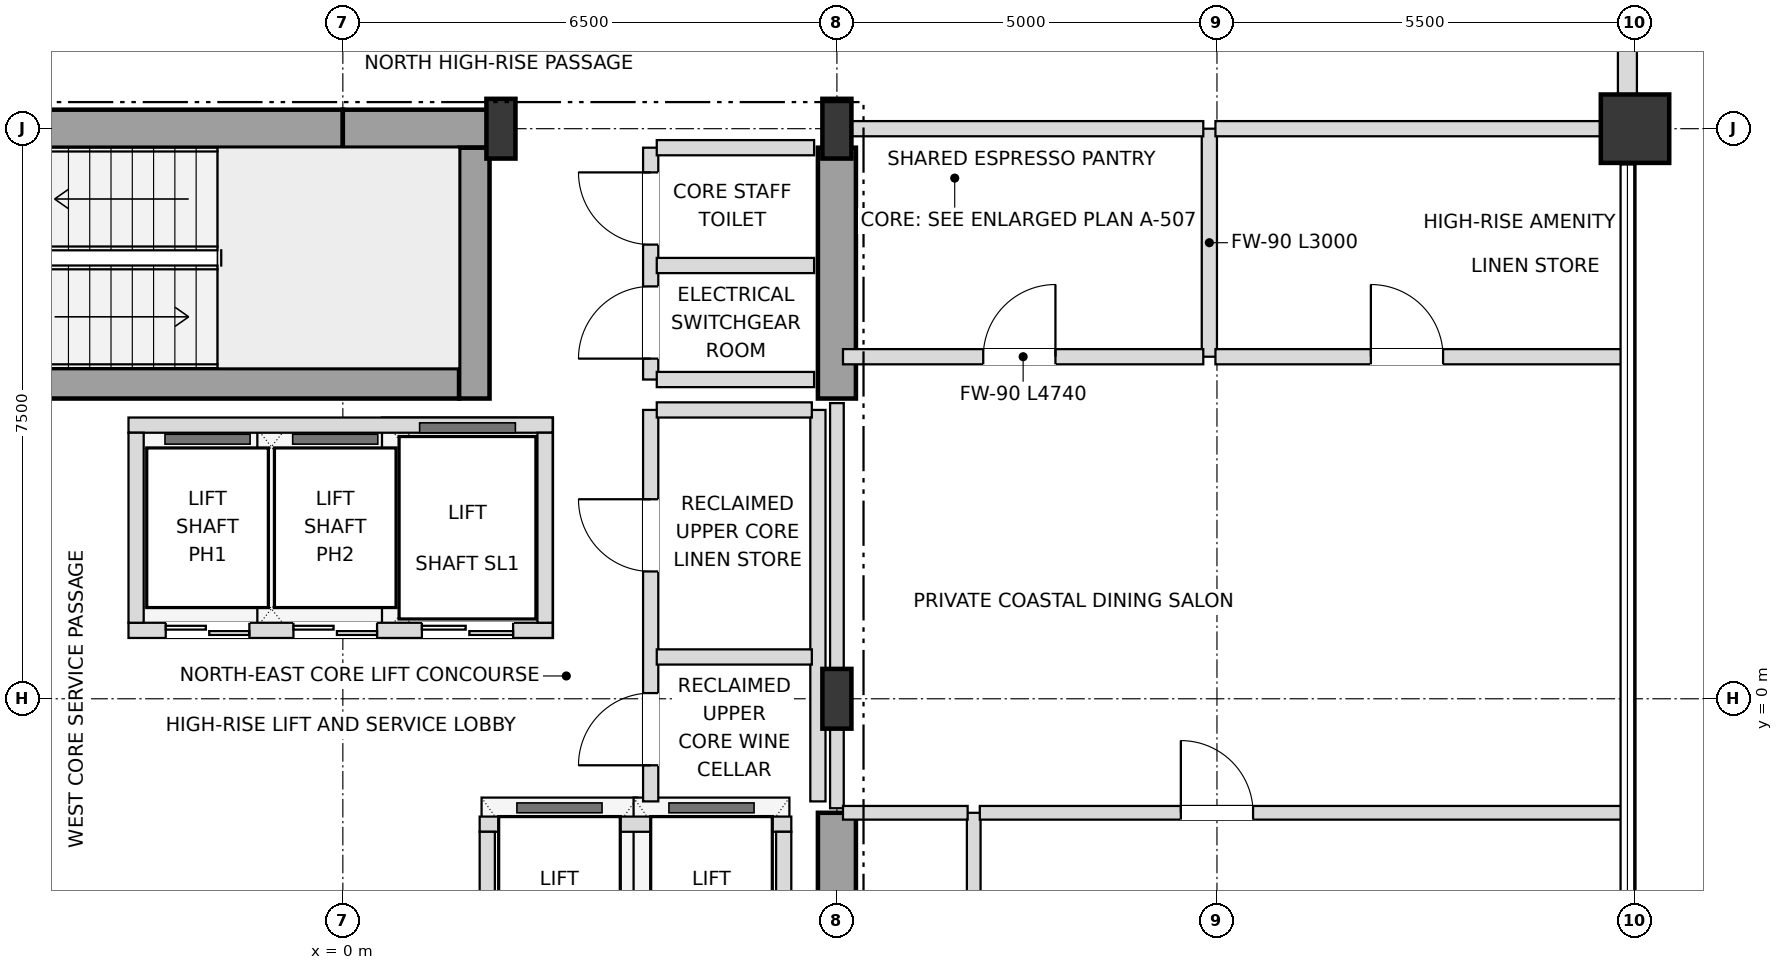
"""IFC4 building model, lengths in metres.
Left out: names, types, materials, properties, quantities, classifications, styles, units other than length and angle.
Written with IfcOpenShell. Run it as: python <this file> out.ifc"""

import sys

from ifc_helpers import new_model, si_unit, direction, frame, frame_2d, origin, origin_2d, place, context, subcontext, project, spatial, rectangle, i_section, extrude, element, fill, save


model = new_model("IFC4")
c1 = context("Model", 3, precision=1e-05, world=origin(), true_north=direction((0.0, 1.0)))
c2 = subcontext(c1, "Body", "Model", "MODEL_VIEW")
j1 = project(units=[si_unit("LENGTHUNIT", "METRE"), si_unit("PLANEANGLEUNIT", "RADIAN")], contexts=[c1])
p1 = place(None, origin())
s1 = spatial("IfcSite", under=j1, at=p1, CompositionType="ELEMENT")
p2 = place(p1, origin())
s2 = spatial("IfcBuilding", under=s1, at=p2, CompositionType="ELEMENT")
p3 = place(p2, frame((0.0, 0.0, 297.9)))
s3 = spatial("IfcBuildingStorey", under=s2, at=p3, CompositionType="ELEMENT", Elevation=297.9)
for number, where, z_axis, x_axis in (
    (1, (6.5, 0.0, 0.0), (0.0, 0.0, 1.0), (1.0, 0.0, 0.0)),
    (2, (2.08, 7.5, 0.0), (0.0, 0.0, 1.0), (1.0, 0.0, 0.0)),
    (3, (6.5, 7.5, 0.0), (0.0, 0.0, 1.0), (1.0, 0.0, 0.0)),
):
    element("IfcColumn", number, at=place(p3, frame(where, z_axis=z_axis, x_axis=x_axis)), inside=s3, PredefinedType="COLUMN", context=c2, shape_type="SweptSolid", body=[
        extrude(i_section(OverallWidth=0.382, OverallDepth=0.786, WebThickness=0.02, FlangeThickness=0.033, at=origin_2d()), origin(), (0.0, 0.0, 1.0), 3.6),
    ])
p4 = place(p3, frame((17.0, 7.5, 0.0), z_axis=(0.0, 0.0, 1.0), x_axis=(1.0, 0.0, 0.0)))
e4 = element("IfcColumn", 4, at=p4, inside=s3, PredefinedType="USERDEFINED", context=c2, shape_type="SweptSolid", body=[
    extrude(rectangle(XDim=0.9, YDim=0.9, at=origin_2d()), origin(), (0.0, 0.0, 1.0), 3.6),
])
p5 = place(p3, frame((16.9, 7.945, 0.0), z_axis=(0.0, 0.0, 1.0), x_axis=(0.0, 1.0, 0.0)))
e5 = element("IfcWall", 5, at=p5, inside=s3, PredefinedType="SOLIDWALL", context=c2, shape_type="SweptSolid", body=[
    extrude(rectangle(XDim=4.61, YDim=0.25, at=frame_2d((2.305, 0.0))), origin(), (0.0, 0.0, 1.0), 2.748),
])
p6 = place(p5, frame((1.405, 0.0, 0.72)))
e6 = element("IfcOpeningElement", 6, at=p6, cuts=e5, PredefinedType="OPENING", context=c2, shape_type="SweptSolid", body=[
    extrude(rectangle(XDim=1.8, YDim=1.68, at=frame_2d((0.9, 0.84))), frame((0.0, 0.135, 0.0), z_axis=(0.0, -1.0, 0.0), x_axis=(1.0, 0.0, 0.0)), (0.0, 0.0, 1.0), 0.27),
])
p7 = place(p3, frame((-6.75, 7.5, 0.0), z_axis=(0.0, 0.0, 1.0), x_axis=(1.0, 0.0, 0.0)))
e7 = element("IfcWall", 7, at=p7, inside=s3, PredefinedType="SHEAR", context=c2, shape_type="SweptSolid", body=[
    extrude(rectangle(XDim=6.75, YDim=0.5, at=frame_2d((3.375, 0.0))), origin(), (0.0, 0.0, 1.0), 3.38),
])
p8 = place(p7, frame((1.65, 0.0, 0.0)))
e8 = element("IfcOpeningElement", 8, at=p8, cuts=e7, PredefinedType="OPENING", context=c2, shape_type="SweptSolid", body=[
    extrude(rectangle(XDim=1.05, YDim=2.15, at=frame_2d((0.525, 1.075))), frame((0.0, 0.26, 0.0), z_axis=(0.0, -1.0, 0.0), x_axis=(1.0, 0.0, 0.0)), (0.0, 0.0, 1.0), 0.52),
])
p9 = place(p3, frame((0.0, 7.5, 0.0), z_axis=(0.0, 0.0, 1.0), x_axis=(1.0, 0.0, 0.0)))
e9 = element("IfcWall", 9, at=p9, inside=s3, PredefinedType="SHEAR", context=c2, shape_type="SweptSolid", body=[
    extrude(rectangle(XDim=2.08, YDim=0.5, at=frame_2d((1.04, 0.0))), origin(), (0.0, 0.0, 1.0), 3.38),
])
p10 = place(p3, frame((6.5, -7.25, 0.0), z_axis=(0.0, 0.0, 1.0), x_axis=(0.0, 1.0, 0.0)))
e10 = element("IfcWall", 10, at=p10, inside=s3, PredefinedType="SHEAR", context=c2, shape_type="SweptSolid", body=[
    extrude(rectangle(XDim=5.75, YDim=0.5, at=frame_2d((2.875, 0.0))), origin(), (0.0, 0.0, 1.0), 3.38),
])
p11 = place(p10, frame((0.85, 0.0, 0.0)))
e11 = element("IfcOpeningElement", 11, at=p11, cuts=e10, PredefinedType="OPENING", context=c2, shape_type="SweptSolid", body=[
    extrude(rectangle(XDim=1.05, YDim=2.15, at=frame_2d((0.525, 1.075))), frame((0.0, 0.26, 0.0), z_axis=(0.0, -1.0, 0.0), x_axis=(1.0, 0.0, 0.0)), (0.0, 0.0, 1.0), 0.52),
])
p12 = place(p3, frame((6.5, 3.95, 0.0), z_axis=(0.0, 0.0, 1.0), x_axis=(0.0, 1.0, 0.0)))
e12 = element("IfcWall", 12, at=p12, inside=s3, PredefinedType="SHEAR", context=c2, shape_type="SweptSolid", body=[
    extrude(rectangle(XDim=3.3, YDim=0.5, at=frame_2d((1.65, 0.0))), origin(), (0.0, 0.0, 1.0), 3.38),
])
p13 = place(p3, frame((-5.55, 4.15, 0.0), z_axis=(0.0, 0.0, 1.0), x_axis=(1.0, 0.0, 0.0)))
e13 = element("IfcWall", 13, at=p13, inside=s3, PredefinedType="SHEAR", context=c2, shape_type="SweptSolid", body=[
    extrude(rectangle(XDim=7.08, YDim=0.4, at=frame_2d((3.54, 0.0))), origin(), (0.0, 0.0, 1.0), 3.38),
])
p14 = place(p3, frame((1.73, 3.95, 0.0), z_axis=(0.0, 0.0, 1.0), x_axis=(0.0, 1.0, 0.0)))
e14 = element("IfcWall", 14, at=p14, inside=s3, PredefinedType="SHEAR", context=c2, shape_type="SweptSolid", body=[
    extrude(rectangle(XDim=3.3, YDim=0.4, at=frame_2d((1.65, 0.0))), origin(), (0.0, 0.0, 1.0), 3.38),
])
p15 = place(p3, frame((-2.82, 0.9, 0.0), z_axis=(0.0, 0.0, 1.0), x_axis=(1.0, 0.0, 0.0)))
e15 = element("IfcWall", 15, at=p15, inside=s3, PredefinedType="SOLIDWALL", context=c2, shape_type="SweptSolid", body=[
    extrude(rectangle(XDim=5.58, YDim=0.2, at=frame_2d((2.79, 0.0))), origin(), (0.0, 0.0, 1.0), 3.38),
])
p16 = place(p15, frame((0.49, 0.0, 0.0)))
e16 = element("IfcOpeningElement", 16, at=p16, cuts=e15, PredefinedType="OPENING", context=c2, shape_type="SweptSolid", body=[
    extrude(rectangle(XDim=1.1, YDim=2.15, at=frame_2d((0.55, 1.075))), frame((0.0, 0.11, 0.0), z_axis=(0.0, -1.0, 0.0), x_axis=(1.0, 0.0, 0.0)), (0.0, 0.0, 1.0), 0.22),
])
p17 = place(p15, frame((2.17, 0.0, 0.0)))
e17 = element("IfcOpeningElement", 17, at=p17, cuts=e15, PredefinedType="OPENING", context=c2, shape_type="SweptSolid", body=[
    extrude(rectangle(XDim=1.1, YDim=2.15, at=frame_2d((0.55, 1.075))), frame((0.0, 0.11, 0.0), z_axis=(0.0, -1.0, 0.0), x_axis=(1.0, 0.0, 0.0)), (0.0, 0.0, 1.0), 0.22),
])
p18 = place(p15, frame((3.86, 0.0, 0.0)))
e18 = element("IfcOpeningElement", 18, at=p18, cuts=e15, PredefinedType="OPENING", context=c2, shape_type="SweptSolid", body=[
    extrude(rectangle(XDim=1.2, YDim=2.2, at=frame_2d((0.6, 1.1))), frame((0.0, 0.11, 0.0), z_axis=(0.0, -1.0, 0.0), x_axis=(1.0, 0.0, 0.0)), (0.0, 0.0, 1.0), 0.22),
])
p19 = place(p3, frame((-2.82, 3.6, 0.0), z_axis=(0.0, 0.0, 1.0), x_axis=(1.0, 0.0, 0.0)))
e19 = element("IfcWall", 19, at=p19, inside=s3, PredefinedType="SOLIDWALL", context=c2, shape_type="SweptSolid", body=[
    extrude(rectangle(XDim=5.58, YDim=0.2, at=frame_2d((2.79, 0.0))), origin(), (0.0, 0.0, 1.0), 3.38),
])
for number, where, z_axis, x_axis in (
    (20, (-2.72, 1.0, 0.0), (0.0, 0.0, 1.0), (0.0, 1.0, 0.0)),
    (21, (2.66, 1.0, 0.0), (0.0, 0.0, 1.0), (0.0, 1.0, 0.0)),
):
    element("IfcWall", number, at=place(p3, frame(where, z_axis=z_axis, x_axis=x_axis)), inside=s3, PredefinedType="SOLIDWALL", context=c2, shape_type="SweptSolid", body=[
        extrude(rectangle(XDim=2.5, YDim=0.2, at=frame_2d((1.25, 0.0))), origin(), (0.0, 0.0, 1.0), 3.38),
    ])
p20 = place(p3, frame((1.8, -1.65, 0.0), z_axis=(0.0, 0.0, 1.0), x_axis=(1.0, 0.0, 0.0)))
e22 = element("IfcWall", 22, at=p20, inside=s3, PredefinedType="SOLIDWALL", context=c2, shape_type="SweptSolid", body=[
    extrude(rectangle(XDim=4.1, YDim=0.2, at=frame_2d((2.05, 0.0))), origin(), (0.0, 0.0, 1.0), 3.38),
])
for number, where, z_axis, x_axis in (
    (23, (1.9, -3.75, 0.0), (0.0, 0.0, 1.0), (0.0, 1.0, 0.0)),
    (24, (5.8, -3.75, 0.0), (0.0, 0.0, 1.0), (0.0, 1.0, 0.0)),
):
    element("IfcWall", number, at=place(p3, frame(where, z_axis=z_axis, x_axis=x_axis)), inside=s3, PredefinedType="SOLIDWALL", context=c2, shape_type="SweptSolid", body=[
        extrude(rectangle(XDim=2.0, YDim=0.2, at=frame_2d((1.0, 0.0))), origin(), (0.0, 0.0, 1.0), 3.38),
    ])
p21 = place(p3, frame((4.05, -1.35, 0.0), z_axis=(0.0, 0.0, 1.0), x_axis=(0.0, 1.0, 0.0)))
e25 = element("IfcWall", 25, at=p21, inside=s3, PredefinedType="SOLIDWALL", context=c2, shape_type="SweptSolid", body=[
    extrude(rectangle(XDim=5.15, YDim=0.2, at=frame_2d((2.575, 0.0))), origin(), (0.0, 0.0, 1.0), 3.38),
])
p22 = place(p21, frame((0.475, 0.0, 0.0)))
e26 = element("IfcOpeningElement", 26, at=p22, cuts=e25, PredefinedType="OPENING", context=c2, shape_type="SweptSolid", body=[
    extrude(rectangle(XDim=0.95, YDim=2.15, at=frame_2d((0.475, 1.075))), frame((0.0, 0.11, 0.0), z_axis=(0.0, -1.0, 0.0), x_axis=(1.0, 0.0, 0.0)), (0.0, 0.0, 1.0), 0.22),
])
p23 = place(p21, frame((3.025, 0.0, 0.0)))
e27 = element("IfcOpeningElement", 27, at=p23, cuts=e25, PredefinedType="OPENING", context=c2, shape_type="SweptSolid", body=[
    extrude(rectangle(XDim=0.95, YDim=2.15, at=frame_2d((0.475, 1.075))), frame((0.0, 0.11, 0.0), z_axis=(0.0, -1.0, 0.0), x_axis=(1.0, 0.0, 0.0)), (0.0, 0.0, 1.0), 0.22),
])
p24 = place(p3, frame((4.05, 4.2, 0.0), z_axis=(0.0, 0.0, 1.0), x_axis=(0.0, 1.0, 0.0)))
e28 = element("IfcWall", 28, at=p24, inside=s3, PredefinedType="SOLIDWALL", context=c2, shape_type="SweptSolid", body=[
    extrude(rectangle(XDim=3.05, YDim=0.2, at=frame_2d((1.525, 0.0))), origin(), (0.0, 0.0, 1.0), 3.38),
])
p25 = place(p24, frame((0.275, 0.0, 0.0)))
e29 = element("IfcOpeningElement", 29, at=p25, cuts=e28, PredefinedType="OPENING", context=c2, shape_type="SweptSolid", body=[
    extrude(rectangle(XDim=0.95, YDim=2.15, at=frame_2d((0.475, 1.075))), frame((0.0, 0.11, 0.0), z_axis=(0.0, -1.0, 0.0), x_axis=(1.0, 0.0, 0.0)), (0.0, 0.0, 1.0), 0.22),
])
p26 = place(p24, frame((1.775, 0.0, 0.0)))
e30 = element("IfcOpeningElement", 30, at=p26, cuts=e28, PredefinedType="OPENING", context=c2, shape_type="SweptSolid", body=[
    extrude(rectangle(XDim=0.95, YDim=2.15, at=frame_2d((0.475, 1.075))), frame((0.0, 0.11, 0.0), z_axis=(0.0, -1.0, 0.0), x_axis=(1.0, 0.0, 0.0)), (0.0, 0.0, 1.0), 0.22),
])
p27 = place(p3, frame((6.25, -1.35, 0.0), z_axis=(0.0, 0.0, 1.0), x_axis=(0.0, 1.0, 0.0)))
e31 = element("IfcWall", 31, at=p27, inside=s3, PredefinedType="SOLIDWALL", context=c2, shape_type="SweptSolid", body=[
    extrude(rectangle(XDim=5.15, YDim=0.2, at=frame_2d((2.575, 0.0))), origin(), (0.0, 0.0, 1.0), 3.38),
])
p28 = place(p3, frame((6.5, -1.44, 0.0), z_axis=(0.0, 0.0, 1.0), x_axis=(0.0, 1.0, 0.0)))
e32 = element("IfcWall", 32, at=p28, inside=s3, PredefinedType="PARTITIONING", context=c2, shape_type="SweptSolid", body=[
    extrude(rectangle(XDim=5.33, YDim=0.18, at=frame_2d((2.665, 0.0))), origin(), (0.0, 0.0, 1.0), 2.826),
])
p29 = place(p3, frame((8.3, -7.5, 0.0), z_axis=(0.0, 0.0, 1.0), x_axis=(0.0, 1.0, 0.0)))
e33 = element("IfcWall", 33, at=p29, inside=s3, PredefinedType="PARTITIONING", context=c2, shape_type="SweptSolid", body=[
    extrude(rectangle(XDim=6.0, YDim=0.18, at=frame_2d((3.0, 0.0))), origin(), (0.0, 0.0, 1.0), 3.38),
])
p30 = place(p29, frame((1.425, 0.0, 0.0)))
e34 = element("IfcOpeningElement", 34, at=p30, cuts=e33, PredefinedType="OPENING", context=c2, shape_type="SweptSolid", body=[
    extrude(rectangle(XDim=0.95, YDim=2.15, at=frame_2d((0.475, 1.075))), frame((0.0, 0.1, 0.0), z_axis=(0.0, -1.0, 0.0), x_axis=(1.0, 0.0, 0.0)), (0.0, 0.0, 1.0), 0.2),
])
p31 = place(p3, frame((11.4, 4.5, 0.0), z_axis=(0.0, 0.0, 1.0), x_axis=(0.0, 1.0, 0.0)))
e35 = element("IfcWall", 35, at=p31, inside=s3, PredefinedType="SOLIDWALL", context=c2, shape_type="SweptSolid", body=[
    extrude(rectangle(XDim=3.0, YDim=0.2, at=frame_2d((1.5, 0.0))), origin(), (0.0, 0.0, 1.0), 3.018),
])
p32 = place(p3, frame((6.58, -1.5, 0.0), z_axis=(0.0, 0.0, 1.0), x_axis=(1.0, 0.0, 0.0)))
e36 = element("IfcWall", 36, at=p32, inside=s3, PredefinedType="PARTITIONING", context=c2, shape_type="SweptSolid", body=[
    extrude(rectangle(XDim=1.64, YDim=0.18, at=frame_2d((0.82, 0.0))), origin(), (0.0, 0.0, 1.0), 3.38),
])
p33 = place(p3, frame((8.38, -1.5, 0.0), z_axis=(0.0, 0.0, 1.0), x_axis=(1.0, 0.0, 0.0)))
e37 = element("IfcWall", 37, at=p33, inside=s3, PredefinedType="PARTITIONING", context=c2, shape_type="SweptSolid", body=[
    extrude(rectangle(XDim=8.44, YDim=0.18, at=frame_2d((4.22, 0.0))), origin(), (0.0, 0.0, 1.0), 3.018),
])
p34 = place(p33, frame((2.645, 0.0, 0.0)))
e38 = element("IfcOpeningElement", 38, at=p34, cuts=e37, PredefinedType="OPENING", context=c2, shape_type="SweptSolid", body=[
    extrude(rectangle(XDim=0.95, YDim=2.15, at=frame_2d((0.475, 1.075))), frame((0.0, 0.1, 0.0), z_axis=(0.0, -1.0, 0.0), x_axis=(1.0, 0.0, 0.0)), (0.0, 0.0, 1.0), 0.2),
])
for number, where, z_axis, x_axis in (
    (39, (4.13, 0.55, 0.0), (0.0, 0.0, 1.0), (1.0, 0.0, 0.0)),
    (40, (4.13, 3.8, 0.0), (0.0, 0.0, 1.0), (1.0, 0.0, 0.0)),
):
    element("IfcWall", number, at=place(p3, frame(where, z_axis=z_axis, x_axis=x_axis)), inside=s3, PredefinedType="SOLIDWALL", context=c2, shape_type="SweptSolid", body=[
        extrude(rectangle(XDim=2.04, YDim=0.2, at=frame_2d((1.02, 0.0))), origin(), (0.0, 0.0, 1.0), 3.38),
    ])
p35 = place(p3, frame((4.13, 4.2, 0.0), z_axis=(0.0, 0.0, 1.0), x_axis=(1.0, 0.0, 0.0)))
e41 = element("IfcWall", 41, at=p35, inside=s3, PredefinedType="SOLIDWALL", context=c2, shape_type="SweptSolid", body=[
    extrude(rectangle(XDim=2.07, YDim=0.2, at=frame_2d((1.035, 0.0))), origin(), (0.0, 0.0, 1.0), 3.38),
])
p36 = place(p3, frame((6.58, 4.5, 0.0), z_axis=(0.0, 0.0, 1.0), x_axis=(1.0, 0.0, 0.0)))
e42 = element("IfcWall", 42, at=p36, inside=s3, PredefinedType="SOLIDWALL", context=c2, shape_type="SweptSolid", body=[
    extrude(rectangle(XDim=4.74, YDim=0.2, at=frame_2d((2.37, 0.0))), origin(), (0.0, 0.0, 1.0), 3.38),
])
p37 = place(p36, frame((1.845, 0.0, 0.0)))
e43 = element("IfcOpeningElement", 43, at=p37, cuts=e42, PredefinedType="OPENING", context=c2, shape_type="SweptSolid", body=[
    extrude(rectangle(XDim=0.95, YDim=2.15, at=frame_2d((0.475, 1.075))), frame((0.0, 0.11, 0.0), z_axis=(0.0, -1.0, 0.0), x_axis=(1.0, 0.0, 0.0)), (0.0, 0.0, 1.0), 0.22),
])
p38 = place(p3, frame((11.48, 4.5, 0.0), z_axis=(0.0, 0.0, 1.0), x_axis=(1.0, 0.0, 0.0)))
e44 = element("IfcWall", 44, at=p38, inside=s3, PredefinedType="SOLIDWALL", context=c2, shape_type="SweptSolid", body=[
    extrude(rectangle(XDim=5.34, YDim=0.2, at=frame_2d((2.67, 0.0))), origin(), (0.0, 0.0, 1.0), 3.38),
])
p39 = place(p38, frame((2.045, 0.0, 0.0)))
e45 = element("IfcOpeningElement", 45, at=p39, cuts=e44, PredefinedType="OPENING", context=c2, shape_type="SweptSolid", body=[
    extrude(rectangle(XDim=0.95, YDim=2.15, at=frame_2d((0.475, 1.075))), frame((0.0, 0.11, 0.0), z_axis=(0.0, -1.0, 0.0), x_axis=(1.0, 0.0, 0.0)), (0.0, 0.0, 1.0), 0.22),
])
for number, where, z_axis, x_axis in (
    (46, (4.13, 5.7, 0.0), (0.0, 0.0, 1.0), (1.0, 0.0, 0.0)),
    (47, (4.13, 7.25, 0.0), (0.0, 0.0, 1.0), (1.0, 0.0, 0.0)),
):
    element("IfcWall", number, at=place(p3, frame(where, z_axis=z_axis, x_axis=x_axis)), inside=s3, PredefinedType="SOLIDWALL", context=c2, shape_type="SweptSolid", body=[
        extrude(rectangle(XDim=2.07, YDim=0.2, at=frame_2d((1.035, 0.0))), origin(), (0.0, 0.0, 1.0), 3.38),
    ])
p40 = place(p3, frame((6.5, 7.5, 0.0), z_axis=(0.0, 0.0, 1.0), x_axis=(1.0, 0.0, 0.0)))
e48 = element("IfcWall", 48, at=p40, inside=s3, PredefinedType="SOLIDWALL", context=c2, shape_type="SweptSolid", body=[
    extrude(rectangle(XDim=4.82, YDim=0.2, at=frame_2d((2.41, 0.0))), origin(), (0.0, 0.0, 1.0), 2.826),
])
p41 = place(p3, frame((11.48, 7.5, 0.0), z_axis=(0.0, 0.0, 1.0), x_axis=(1.0, 0.0, 0.0)))
e49 = element("IfcWall", 49, at=p41, inside=s3, PredefinedType="SOLIDWALL", context=c2, shape_type="SweptSolid", body=[
    extrude(rectangle(XDim=5.42, YDim=0.2, at=frame_2d((2.71, 0.0))), origin(), (0.0, 0.0, 1.0), 2.826),
])
p42 = place(p16, origin())
e50 = element("IfcDoor", 50, at=p42, inside=s3, OperationType="DOUBLE_DOOR_SLIDING", PredefinedType="DOOR", context=c2, shape_type="SweptSolid", body=[
    extrude(rectangle(XDim=1.1, YDim=2.15, at=frame_2d((0.55, 1.075))), frame((0.0, 0.025, 0.0), z_axis=(0.0, -1.0, 0.0), x_axis=(1.0, 0.0, 0.0)), (0.0, 0.0, 1.0), 0.05),
])
fill(e16, e50)
p43 = place(p17, origin())
e51 = element("IfcDoor", 51, at=p43, inside=s3, OperationType="DOUBLE_DOOR_SLIDING", PredefinedType="DOOR", context=c2, shape_type="SweptSolid", body=[
    extrude(rectangle(XDim=1.1, YDim=2.15, at=frame_2d((0.55, 1.075))), frame((0.0, 0.025, 0.0), z_axis=(0.0, -1.0, 0.0), x_axis=(1.0, 0.0, 0.0)), (0.0, 0.0, 1.0), 0.05),
])
fill(e17, e51)
p44 = place(p18, origin())
e52 = element("IfcDoor", 52, at=p44, inside=s3, OperationType="DOUBLE_DOOR_SLIDING", PredefinedType="DOOR", context=c2, shape_type="SweptSolid", body=[
    extrude(rectangle(XDim=1.2, YDim=2.2, at=frame_2d((0.6, 1.1))), frame((0.0, 0.025, 0.0), z_axis=(0.0, -1.0, 0.0), x_axis=(1.0, 0.0, 0.0)), (0.0, 0.0, 1.0), 0.05),
])
fill(e18, e52)
p45 = place(p22, origin())
e53 = element("IfcDoor", 53, at=p45, inside=s3, OperationType="SINGLE_SWING_LEFT", PredefinedType="DOOR", context=c2, shape_type="SweptSolid", body=[
    extrude(rectangle(XDim=0.95, YDim=2.15, at=frame_2d((0.475, 1.075))), frame((0.0, 0.025, 0.0), z_axis=(0.0, -1.0, 0.0), x_axis=(1.0, 0.0, 0.0)), (0.0, 0.0, 1.0), 0.05),
])
fill(e26, e53)
p46 = place(p23, origin())
e54 = element("IfcDoor", 54, at=p46, inside=s3, OperationType="SINGLE_SWING_RIGHT", PredefinedType="DOOR", context=c2, shape_type="SweptSolid", body=[
    extrude(rectangle(XDim=0.95, YDim=2.15, at=frame_2d((0.475, 1.075))), frame((0.0, 0.025, 0.0), z_axis=(0.0, -1.0, 0.0), x_axis=(1.0, 0.0, 0.0)), (0.0, 0.0, 1.0), 0.05),
])
fill(e27, e54)
p47 = place(p25, origin())
e55 = element("IfcDoor", 55, at=p47, inside=s3, OperationType="SINGLE_SWING_LEFT", PredefinedType="DOOR", context=c2, shape_type="SweptSolid", body=[
    extrude(rectangle(XDim=0.95, YDim=2.15, at=frame_2d((0.475, 1.075))), frame((0.0, 0.025, 0.0), z_axis=(0.0, -1.0, 0.0), x_axis=(1.0, 0.0, 0.0)), (0.0, 0.0, 1.0), 0.05),
])
fill(e29, e55)
p48 = place(p26, origin())
e56 = element("IfcDoor", 56, at=p48, inside=s3, OperationType="SINGLE_SWING_RIGHT", PredefinedType="DOOR", context=c2, shape_type="SweptSolid", body=[
    extrude(rectangle(XDim=0.95, YDim=2.15, at=frame_2d((0.475, 1.075))), frame((0.0, 0.025, 0.0), z_axis=(0.0, -1.0, 0.0), x_axis=(1.0, 0.0, 0.0)), (0.0, 0.0, 1.0), 0.05),
])
fill(e30, e56)
p49 = place(p34, origin())
e57 = element("IfcDoor", 57, at=p49, inside=s3, OperationType="SINGLE_SWING_LEFT", PredefinedType="DOOR", context=c2, shape_type="SweptSolid", body=[
    extrude(rectangle(XDim=0.95, YDim=2.15, at=frame_2d((0.475, 1.075))), frame((0.0, 0.025, 0.0), z_axis=(0.0, -1.0, 0.0), x_axis=(1.0, 0.0, 0.0)), (0.0, 0.0, 1.0), 0.05),
])
fill(e38, e57)
p50 = place(p37, origin())
e58 = element("IfcDoor", 58, at=p50, inside=s3, OperationType="SINGLE_SWING_RIGHT", PredefinedType="DOOR", context=c2, shape_type="SweptSolid", body=[
    extrude(rectangle(XDim=0.95, YDim=2.15, at=frame_2d((0.475, 1.075))), frame((0.0, 0.025, 0.0), z_axis=(0.0, -1.0, 0.0), x_axis=(1.0, 0.0, 0.0)), (0.0, 0.0, 1.0), 0.05),
])
fill(e43, e58)
p51 = place(p39, origin())
e59 = element("IfcDoor", 59, at=p51, inside=s3, OperationType="SINGLE_SWING_LEFT", PredefinedType="DOOR", context=c2, shape_type="SweptSolid", body=[
    extrude(rectangle(XDim=0.95, YDim=2.15, at=frame_2d((0.475, 1.075))), frame((0.0, 0.025, 0.0), z_axis=(0.0, -1.0, 0.0), x_axis=(1.0, 0.0, 0.0)), (0.0, 0.0, 1.0), 0.05),
])
fill(e45, e59)
save(model, sys.argv[1])
